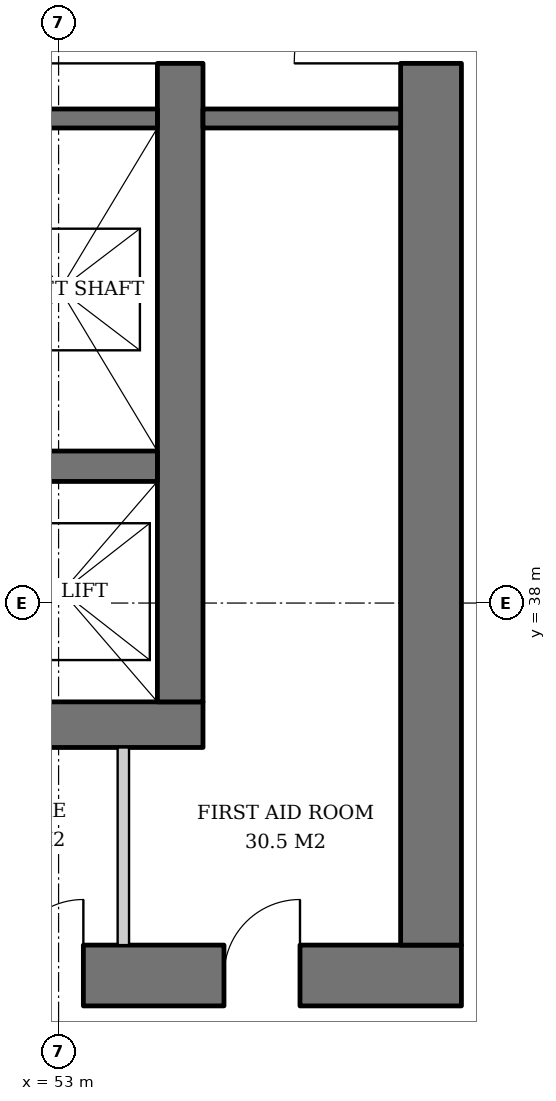
"""IFC4 building model, lengths in metres.
Left out: names, types, materials, properties, quantities, classifications, styles, units other than length and angle.
Written with IfcOpenShell. Run it as: python <this file> out.ifc"""

import sys

from ifc_helpers import new_model, si_unit, direction, frame, frame_2d, origin, place, context, subcontext, project, spatial, rectangle, extrude, element, fill, save


model = new_model("IFC4")
c1 = context("Model", 3, precision=1e-05, world=origin(), true_north=direction((0.0, 1.0)))
c2 = subcontext(c1, "Body", "Model", "MODEL_VIEW")
j1 = project(units=[si_unit("LENGTHUNIT", "METRE"), si_unit("PLANEANGLEUNIT", "RADIAN")], contexts=[c1])
p1 = place(None, origin())
s1 = spatial("IfcSite", under=j1, at=p1, CompositionType="ELEMENT")
p2 = place(p1, origin())
s2 = spatial("IfcBuilding", under=s1, at=p2, CompositionType="ELEMENT")
p3 = place(p2, frame((0.0, 0.0, 24.8)))
s3 = spatial("IfcBuildingStorey", under=s2, at=p3, CompositionType="ELEMENT", Elevation=24.8)
p4 = place(p3, frame((35.1, 36.4, 0.0), z_axis=(0.0, 0.0, 1.0), x_axis=(1.0, 0.0, 0.0)))
e1 = element("IfcWall", 1, at=p4, inside=s3, PredefinedType="SHEAR", context=c2, shape_type="SweptSolid", body=[
    extrude(rectangle(XDim=19.8, YDim=0.6, at=frame_2d((9.9, 0.0))), origin(), (0.0, 0.0, 1.0), 3.8),
])
p5 = place(p4, frame((3.9, 0.0, 0.0)))
e2 = element("IfcOpeningElement", 2, at=p5, cuts=e1, PredefinedType="OPENING", context=c2, shape_type="SweptSolid", body=[
    extrude(rectangle(XDim=1.0, YDim=2.1, at=frame_2d((0.5, 1.05))), frame((0.0, 0.31, 0.0), z_axis=(0.0, -1.0, 0.0), x_axis=(1.0, 0.0, 0.0)), (0.0, 0.0, 1.0), 0.62),
])
p6 = place(p4, frame((15.35, 0.0, 0.0)))
e3 = element("IfcOpeningElement", 3, at=p6, cuts=e1, PredefinedType="OPENING", context=c2, shape_type="SweptSolid", body=[
    extrude(rectangle(XDim=1.0, YDim=2.1, at=frame_2d((0.5, 1.05))), frame((0.0, 0.31, 0.0), z_axis=(0.0, -1.0, 0.0), x_axis=(1.0, 0.0, 0.0)), (0.0, 0.0, 1.0), 0.62),
])
p7 = place(p3, frame((54.6, 36.7, 0.0), z_axis=(0.0, 0.0, 1.0), x_axis=(0.0, 1.0, 0.0)))
e4 = element("IfcWall", 4, at=p7, inside=s3, PredefinedType="SHEAR", context=c2, shape_type="SweptSolid", body=[
    extrude(rectangle(XDim=18.6, YDim=0.6, at=frame_2d((9.3, 0.0))), origin(), (0.0, 0.0, 1.0), 3.8),
])
p8 = place(p7, frame((8.4, 0.0, 0.0)))
e5 = element("IfcOpeningElement", 5, at=p8, cuts=e4, PredefinedType="OPENING", context=c2, shape_type="SweptSolid", body=[
    extrude(rectangle(XDim=1.8, YDim=2.4, at=frame_2d((0.9, 1.2))), frame((0.0, 0.31, 0.0), z_axis=(0.0, -1.0, 0.0), x_axis=(1.0, 0.0, 0.0)), (0.0, 0.0, 1.0), 0.62),
])
p9 = place(p3, frame((31.7, 33.1, 0.0), z_axis=(0.0, 0.0, 1.0), x_axis=(1.0, 0.0, 0.0)))
e6 = element("IfcWall", 6, at=p9, inside=s3, PredefinedType="SHEAR", context=c2, shape_type="SweptSolid", body=[
    extrude(rectangle(XDim=26.6, YDim=0.8, at=frame_2d((13.3, 0.0))), origin(), (0.0, 0.0, 1.0), 3.8),
])
p10 = place(p9, frame((7.3, 0.0, 0.0)))
e7 = element("IfcOpeningElement", 7, at=p10, cuts=e6, PredefinedType="OPENING", context=c2, shape_type="SweptSolid", body=[
    extrude(rectangle(XDim=1.0, YDim=2.1, at=frame_2d((0.5, 1.05))), frame((0.0, 0.41, 0.0), z_axis=(0.0, -1.0, 0.0), x_axis=(1.0, 0.0, 0.0)), (0.0, 0.0, 1.0), 0.82),
])
p11 = place(p9, frame((18.75, 0.0, 0.0)))
e8 = element("IfcOpeningElement", 8, at=p11, cuts=e6, PredefinedType="OPENING", context=c2, shape_type="SweptSolid", body=[
    extrude(rectangle(XDim=1.0, YDim=2.1, at=frame_2d((0.5, 1.05))), frame((0.0, 0.41, 0.0), z_axis=(0.0, -1.0, 0.0), x_axis=(1.0, 0.0, 0.0)), (0.0, 0.0, 1.0), 0.82),
])
p12 = place(p9, frame((1.9, 0.0, 0.0)))
e9 = element("IfcOpeningElement", 9, at=p12, cuts=e6, PredefinedType="OPENING", context=c2, shape_type="SweptSolid", body=[
    extrude(rectangle(XDim=1.0, YDim=2.1, at=frame_2d((0.5, 1.05))), frame((0.0, 0.41, 0.0), z_axis=(0.0, -1.0, 0.0), x_axis=(1.0, 0.0, 0.0)), (0.0, 0.0, 1.0), 0.82),
])
p13 = place(p9, frame((4.725, 0.0, 0.0)))
e10 = element("IfcOpeningElement", 10, at=p13, cuts=e6, PredefinedType="OPENING", context=c2, shape_type="SweptSolid", body=[
    extrude(rectangle(XDim=1.0, YDim=2.1, at=frame_2d((0.5, 1.05))), frame((0.0, 0.41, 0.0), z_axis=(0.0, -1.0, 0.0), x_axis=(1.0, 0.0, 0.0)), (0.0, 0.0, 1.0), 0.82),
])
p14 = place(p9, frame((12.44, 0.0, 0.0)))
e11 = element("IfcOpeningElement", 11, at=p14, cuts=e6, PredefinedType="OPENING", context=c2, shape_type="SweptSolid", body=[
    extrude(rectangle(XDim=1.0, YDim=2.1, at=frame_2d((0.5, 1.05))), frame((0.0, 0.41, 0.0), z_axis=(0.0, -1.0, 0.0), x_axis=(1.0, 0.0, 0.0)), (0.0, 0.0, 1.0), 0.82),
])
p15 = place(p9, frame((20.626, 0.0, 0.0)))
e12 = element("IfcOpeningElement", 12, at=p15, cuts=e6, PredefinedType="OPENING", context=c2, shape_type="SweptSolid", body=[
    extrude(rectangle(XDim=1.0, YDim=2.1, at=frame_2d((0.5, 1.05))), frame((0.0, 0.41, 0.0), z_axis=(0.0, -1.0, 0.0), x_axis=(1.0, 0.0, 0.0)), (0.0, 0.0, 1.0), 0.82),
])
p16 = place(p9, frame((23.476, 0.0, 0.0)))
e13 = element("IfcOpeningElement", 13, at=p16, cuts=e6, PredefinedType="OPENING", context=c2, shape_type="SweptSolid", body=[
    extrude(rectangle(XDim=1.0, YDim=2.1, at=frame_2d((0.5, 1.05))), frame((0.0, 0.41, 0.0), z_axis=(0.0, -1.0, 0.0), x_axis=(1.0, 0.0, 0.0)), (0.0, 0.0, 1.0), 0.82),
])
p17 = place(p3, frame((57.9, 33.5, 0.0), z_axis=(0.0, 0.0, 1.0), x_axis=(0.0, 1.0, 0.0)))
e14 = element("IfcWall", 14, at=p17, inside=s3, PredefinedType="SHEAR", context=c2, shape_type="SweptSolid", body=[
    extrude(rectangle(XDim=25.0, YDim=0.8, at=frame_2d((12.5, 0.0))), origin(), (0.0, 0.0, 1.0), 3.8),
])
p18 = place(p17, frame((11.6, 0.0, 0.0)))
e15 = element("IfcOpeningElement", 15, at=p18, cuts=e14, PredefinedType="OPENING", context=c2, shape_type="SweptSolid", body=[
    extrude(rectangle(XDim=1.8, YDim=2.4, at=frame_2d((0.9, 1.2))), frame((0.0, 0.41, 0.0), z_axis=(0.0, -1.0, 0.0), x_axis=(1.0, 0.0, 0.0)), (0.0, 0.0, 1.0), 0.82),
])
p19 = place(p3, frame((35.7, 39.8, 0.0), z_axis=(0.0, 0.0, 1.0), x_axis=(1.0, 0.0, 0.0)))
e16 = element("IfcWall", 16, at=p19, inside=s3, PredefinedType="SHEAR", context=c2, shape_type="SweptSolid", body=[
    extrude(rectangle(XDim=18.6, YDim=0.4, at=frame_2d((9.3, 0.0))), origin(), (0.0, 0.0, 1.0), 3.8),
])
p20 = place(p3, frame((48.93, 44.375, 0.0), z_axis=(0.0, 0.0, 1.0), x_axis=(1.0, 0.0, 0.0)))
e17 = element("IfcWall", 17, at=p20, inside=s3, PredefinedType="SHEAR", context=c2, shape_type="SweptSolid", body=[
    extrude(rectangle(XDim=5.37, YDim=0.25, at=frame_2d((2.685, 0.0))), origin(), (0.0, 0.0, 1.0), 3.8),
])
p21 = place(p3, frame((54.9, 44.375, 0.0), z_axis=(0.0, 0.0, 1.0), x_axis=(1.0, 0.0, 0.0)))
e18 = element("IfcWall", 18, at=p21, inside=s3, PredefinedType="SOLIDWALL", context=c2, shape_type="SweptSolid", body=[
    extrude(rectangle(XDim=2.6, YDim=0.25, at=frame_2d((1.3, 0.0))), origin(), (0.0, 0.0, 1.0), 3.62),
])
p22 = place(p3, frame((53.852, 33.5, 0.0), z_axis=(0.0, 0.0, 1.0), x_axis=(0.0, 1.0, 0.0)))
e19 = element("IfcWall", 19, at=p22, inside=s3, PredefinedType="SOLIDWALL", context=c2, shape_type="SweptSolid", body=[
    extrude(rectangle(XDim=2.6, YDim=0.15, at=frame_2d((1.3, 0.0))), origin(), (0.0, 0.0, 1.0), 3.62),
])
p23 = place(p8, origin())
e20 = element("IfcDoor", 20, at=p23, inside=s3, OperationType="DOUBLE_DOOR_SINGLE_SWING", PredefinedType="DOOR", context=c2, shape_type="SweptSolid", body=[
    extrude(rectangle(XDim=1.8, YDim=2.4, at=frame_2d((0.9, 1.2))), frame((0.0, 0.025, 0.0), z_axis=(0.0, -1.0, 0.0), x_axis=(1.0, 0.0, 0.0)), (0.0, 0.0, 1.0), 0.05),
])
fill(e5, e20)
p24 = place(p18, origin())
e21 = element("IfcDoor", 21, at=p24, inside=s3, OperationType="DOUBLE_DOOR_SINGLE_SWING", PredefinedType="DOOR", context=c2, shape_type="SweptSolid", body=[
    extrude(rectangle(XDim=1.8, YDim=2.4, at=frame_2d((0.9, 1.2))), frame((0.0, 0.025, 0.0), z_axis=(0.0, -1.0, 0.0), x_axis=(1.0, 0.0, 0.0)), (0.0, 0.0, 1.0), 0.05),
])
fill(e15, e21)
p25 = place(p15, origin())
e22 = element("IfcDoor", 22, at=p25, inside=s3, OperationType="SINGLE_SWING_RIGHT", PredefinedType="DOOR", context=c2, shape_type="SweptSolid", body=[
    extrude(rectangle(XDim=1.0, YDim=2.1, at=frame_2d((0.5, 1.05))), frame((0.0, 0.39, 0.0), z_axis=(0.0, -1.0, 0.0), x_axis=(1.0, 0.0, 0.0)), (0.0, 0.0, 1.0), 0.05),
])
fill(e12, e22)
p26 = place(p16, origin())
e23 = element("IfcDoor", 23, at=p26, inside=s3, OperationType="SINGLE_SWING_RIGHT", PredefinedType="DOOR", context=c2, shape_type="SweptSolid", body=[
    extrude(rectangle(XDim=1.0, YDim=2.1, at=frame_2d((0.5, 1.05))), frame((0.0, 0.39, 0.0), z_axis=(0.0, -1.0, 0.0), x_axis=(1.0, 0.0, 0.0)), (0.0, 0.0, 1.0), 0.05),
])
fill(e13, e23)
save(model, sys.argv[1])
